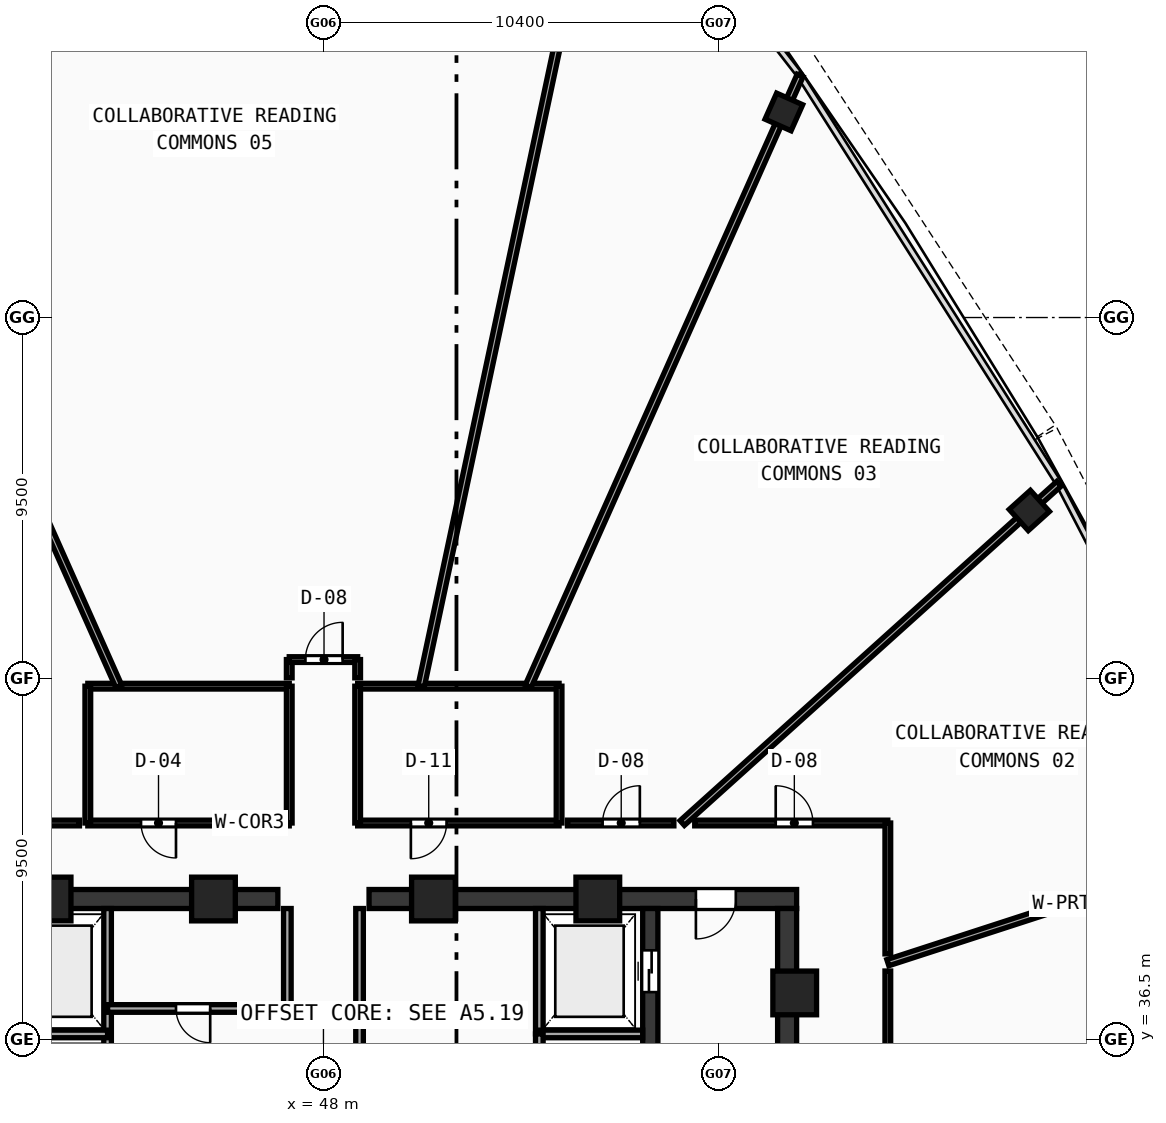
"""IFC4 building model, lengths in metres.
Left out: names, types, materials, properties, quantities, classifications, styles, units other than length and angle.
Written with IfcOpenShell. Run it as: python <this file> out.ifc"""

import sys

from ifc_helpers import new_model, si_unit, direction, frame, frame_2d, origin, origin_with_axes, origin_2d, place, context, subcontext, project, spatial, rectangle, hollow_rectangle, extrude, source, transform, mapped, element, fill, save


model = new_model("IFC4")
c1 = context("Model", 3, precision=1e-05, world=origin(), true_north=direction((0.0, 1.0)))
c2 = subcontext(c1, "Body", "Model", "MODEL_VIEW")
j1 = project(units=[si_unit("LENGTHUNIT", "METRE"), si_unit("PLANEANGLEUNIT", "RADIAN")], contexts=[c1])
p1 = place(None, origin())
s1 = spatial("IfcSite", under=j1, at=p1, CompositionType="ELEMENT")
p2 = place(p1, origin())
s2 = spatial("IfcBuilding", under=s1, at=p2, CompositionType="ELEMENT")
p3 = place(p2, frame((0.0, 0.0, 311.13)))
s3 = spatial("IfcBuildingStorey", under=s2, at=p3, CompositionType="ELEMENT", Elevation=311.13)
p4 = place(p3, frame((35.55, 40.2, 0.0), z_axis=(0.0, 0.0, 1.0), x_axis=(1.0, 0.0, 0.0)))
e1 = element("IfcWall", 1, at=p4, inside=s3, PredefinedType="SHEAR", context=c2, shape_type="SweptSolid", body=[
    extrude(rectangle(XDim=11.25, YDim=0.5, at=frame_2d((5.625, 0.0))), origin(), (0.0, 0.0, 1.0), 3.47),
])
p5 = place(p4, frame((1.6, 0.0, 0.0)))
e2 = element("IfcOpeningElement", 2, at=p5, cuts=e1, PredefinedType="OPENING", context=c2, shape_type="SweptSolid", body=[
    extrude(rectangle(XDim=1.05, YDim=2.1, at=frame_2d((0.525, 1.05))), frame((0.0, 0.26, 0.0), z_axis=(0.0, -1.0, 0.0), x_axis=(1.0, 0.0, 0.0)), (0.0, 0.0, 1.0), 0.52),
])
p6 = place(p3, frame((49.2, 40.2, 0.0), z_axis=(0.0, 0.0, 1.0), x_axis=(1.0, 0.0, 0.0)))
e3 = element("IfcWall", 3, at=p6, inside=s3, PredefinedType="SHEAR", context=c2, shape_type="SweptSolid", body=[
    extrude(rectangle(XDim=11.25, YDim=0.5, at=frame_2d((5.625, 0.0))), origin(), (0.0, 0.0, 1.0), 3.47),
])
p7 = place(p6, frame((8.6, 0.0, 0.0)))
e4 = element("IfcOpeningElement", 4, at=p7, cuts=e3, PredefinedType="OPENING", context=c2, shape_type="SweptSolid", body=[
    extrude(rectangle(XDim=1.05, YDim=2.1, at=frame_2d((0.525, 1.05))), frame((0.0, 0.26, 0.0), z_axis=(0.0, -1.0, 0.0), x_axis=(1.0, 0.0, 0.0)), (0.0, 0.0, 1.0), 0.52),
])
p8 = place(p3, frame((60.2, 27.75, 0.0), z_axis=(0.0, 0.0, 1.0), x_axis=(0.0, 1.0, 0.0)))
e5 = element("IfcWall", 5, at=p8, inside=s3, PredefinedType="SHEAR", context=c2, shape_type="SweptSolid", body=[
    extrude(rectangle(XDim=12.2, YDim=0.5, at=frame_2d((6.1, 0.0))), origin(), (0.0, 0.0, 1.0), 3.47),
])
p9 = place(p3, frame((56.6, 27.75, 0.0), z_axis=(0.0, 0.0, 1.0), x_axis=(0.0, 1.0, 0.0)))
e6 = element("IfcWall", 6, at=p9, inside=s3, PredefinedType="SHEAR", context=c2, shape_type="SweptSolid", body=[
    extrude(rectangle(XDim=12.2, YDim=0.4, at=frame_2d((6.1, 0.0))), origin(), (0.0, 0.0, 1.0), 3.47),
])
p10 = place(p9, frame((10.0, 0.0, 0.0)))
e7 = element("IfcOpeningElement", 7, at=p10, cuts=e6, PredefinedType="OPENING", context=c2, shape_type="SweptSolid", body=[
    extrude(rectangle(XDim=1.1, YDim=2.1, at=frame_2d((0.55, 1.05))), frame((0.0, 0.21, 0.0), z_axis=(0.0, -1.0, 0.0), x_axis=(1.0, 0.0, 0.0)), (0.0, 0.0, 1.0), 0.42),
])
m1 = source(origin(), c2, "Body", "SweptSolid", [
    extrude(hollow_rectangle(XDim=1.15, YDim=1.15, WallThickness=0.048, at=origin_2d()), origin(), (0.0, 0.0, 1.0), 3.73),
])
for number, where, z_axis, x_axis in (
    (8, (60.4, 37.729, -0.26), (0.0, 0.0, 1.0), (1.0, 0.0, 0.0)),
    (9, (55.219, 40.2, -0.26), (0.0, 0.0, 1.0), (1.0, 0.0, 0.0)),
    (10, (50.894, 40.2, -0.26), (0.0, 0.0, 1.0), (1.0, 0.0, 0.0)),
    (11, (45.106, 40.2, -0.26), (0.0, 0.0, 1.0), (1.0, 0.0, 0.0)),
    (12, (40.781, 40.2, -0.26), (0.0, 0.0, 1.0), (1.0, 0.0, 0.0)),
):
    element("IfcColumn", number, at=place(p3, frame(where, z_axis=z_axis, x_axis=x_axis)), inside=s3, PredefinedType="COLUMN", context=c2, shape_type="MappedRepresentation", body=[
        mapped(m1, transform((0.0, 0.0, 0.0), scale=1.0)),
    ])
m2 = source(origin(), c2, "Body", "SweptSolid", [
    extrude(hollow_rectangle(XDim=0.75, YDim=0.75, WallThickness=0.028, at=origin_2d()), origin(), (0.0, 0.0, 1.0), 3.73),
])
for number, where, z_axis, x_axis in (
    (13, (66.573, 50.424, -0.26), (0.0, 0.0, 1.0), (-0.669, 0.743, 0.0)),
    (14, (60.114, 60.909, -0.26), (0.0, 0.0, 1.0), (-0.914, 0.407, 0.0)),
):
    element("IfcColumn", number, at=place(p3, frame(where, z_axis=z_axis, x_axis=x_axis)), inside=s3, PredefinedType="COLUMN", context=c2, shape_type="MappedRepresentation", body=[
        mapped(m2, transform((0.0, 0.0, 0.0), scale=1.0)),
    ])
p11 = place(p3, frame((42.32, 33.5, 0.0), z_axis=(0.0, 0.0, 1.0), x_axis=(0.0, 1.0, 0.0)))
e15 = element("IfcWall", 15, at=p11, inside=s3, PredefinedType="SOLIDWALL", context=c2, shape_type="SweptSolid", body=[
    extrude(rectangle(XDim=6.45, YDim=0.2, at=frame_2d((3.225, 0.0))), origin(), (0.0, 0.0, 1.0), 3.47),
])
p12 = place(p11, frame((1.0, 0.0, 0.0)))
e16 = element("IfcOpeningElement", 16, at=p12, cuts=e15, PredefinedType="OPENING", context=c2, shape_type="SweptSolid", body=[
    extrude(rectangle(XDim=1.05, YDim=2.1, at=frame_2d((0.525, 1.05))), frame((0.0, 0.11, 0.0), z_axis=(0.0, -1.0, 0.0), x_axis=(1.0, 0.0, 0.0)), (0.0, 0.0, 1.0), 0.22),
])
p13 = place(p3, frame((39.6, 36.65, 0.0), z_axis=(0.0, 0.0, 1.0), x_axis=(1.0, 0.0, 0.0)))
e17 = element("IfcWall", 17, at=p13, inside=s3, PredefinedType="SOLIDWALL", context=c2, shape_type="SweptSolid", body=[
    extrude(rectangle(XDim=2.72, YDim=0.2, at=frame_2d((1.36, 0.0))), origin(), (0.0, 0.0, 1.0), 3.47),
])
p14 = place(p3, frame((53.68, 36.65, 0.0), z_axis=(0.0, 0.0, 1.0), x_axis=(0.0, 1.0, 0.0)))
e18 = element("IfcWall", 18, at=p14, inside=s3, PredefinedType="SOLIDWALL", context=c2, shape_type="SweptSolid", body=[
    extrude(rectangle(XDim=3.3, YDim=0.2, at=frame_2d((1.65, 0.0))), origin(), (0.0, 0.0, 1.0), 3.47),
])
p15 = place(p3, frame((53.68, 36.65, 0.0), z_axis=(0.0, 0.0, 1.0), x_axis=(1.0, 0.0, 0.0)))
e19 = element("IfcWall", 19, at=p15, inside=s3, PredefinedType="SOLIDWALL", context=c2, shape_type="SweptSolid", body=[
    extrude(rectangle(XDim=2.72, YDim=0.2, at=frame_2d((1.36, 0.0))), origin(), (0.0, 0.0, 1.0), 3.47),
])
p16 = place(p3, frame((42.32, 37.32, 0.0), z_axis=(0.0, 0.0, 1.0), x_axis=(1.0, 0.0, 0.0)))
e20 = element("IfcWall", 20, at=p16, inside=s3, PredefinedType="SOLIDWALL", context=c2, shape_type="SweptSolid", body=[
    extrude(rectangle(XDim=4.73, YDim=0.2, at=frame_2d((2.365, 0.0))), origin(), (0.0, 0.0, 1.0), 3.47),
])
p17 = place(p16, frame((1.8, 0.0, 0.0)))
e21 = element("IfcOpeningElement", 21, at=p17, cuts=e20, PredefinedType="OPENING", context=c2, shape_type="SweptSolid", body=[
    extrude(rectangle(XDim=0.9, YDim=2.1, at=frame_2d((0.45, 1.05))), frame((0.0, 0.11, 0.0), z_axis=(0.0, -1.0, 0.0), x_axis=(1.0, 0.0, 0.0)), (0.0, 0.0, 1.0), 0.22),
])
p18 = place(p3, frame((47.05, 37.32, 0.0), z_axis=(0.0, 0.0, 1.0), x_axis=(0.0, 1.0, 0.0)))
e22 = element("IfcWall", 22, at=p18, inside=s3, PredefinedType="SOLIDWALL", context=c2, shape_type="SweptSolid", body=[
    extrude(rectangle(XDim=2.63, YDim=0.2, at=frame_2d((1.315, 0.0))), origin(), (0.0, 0.0, 1.0), 3.47),
])
p19 = place(p3, frame((48.95, 35.85, 0.0), z_axis=(0.0, 0.0, 1.0), x_axis=(0.0, 1.0, 0.0)))
e23 = element("IfcWall", 23, at=p19, inside=s3, PredefinedType="SOLIDWALL", context=c2, shape_type="SweptSolid", body=[
    extrude(rectangle(XDim=4.1, YDim=0.2, at=frame_2d((2.05, 0.0))), origin(), (0.0, 0.0, 1.0), 3.47),
])
p20 = place(p3, frame((53.68, 27.6, 0.0), z_axis=(0.0, 0.0, 1.0), x_axis=(0.0, 1.0, 0.0)))
e24 = element("IfcWall", 24, at=p20, inside=s3, PredefinedType="SOLIDWALL", context=c2, shape_type="SweptSolid", body=[
    extrude(rectangle(XDim=9.05, YDim=0.2, at=frame_2d((4.525, 0.0))), origin(), (0.0, 0.0, 1.0), 3.47),
])
p21 = place(p20, frame((6.9, 0.0, 0.0)))
e25 = element("IfcOpeningElement", 25, at=p21, cuts=e24, PredefinedType="OPENING", context=c2, shape_type="SweptSolid", body=[
    extrude(rectangle(XDim=1.05, YDim=2.1, at=frame_2d((0.525, 1.05))), frame((0.0, 0.11, 0.0), z_axis=(0.0, -1.0, 0.0), x_axis=(1.0, 0.0, 0.0)), (0.0, 0.0, 1.0), 0.22),
])
p22 = place(p3, frame((41.8, 42.2, 0.0), z_axis=(0.0, 0.0, 1.0), x_axis=(1.0, 0.0, 0.0)))
e26 = element("IfcWall", 26, at=p22, inside=s3, PredefinedType="PARTITIONING", context=c2, shape_type="SweptSolid", body=[
    extrude(rectangle(XDim=5.3, YDim=0.15, at=frame_2d((2.65, 0.0))), origin(), (0.0, 0.0, 1.0), 2.87),
])
p23 = place(p22, frame((1.4, 0.0, 0.0)))
e27 = element("IfcOpeningElement", 27, at=p23, cuts=e26, PredefinedType="OPENING", context=c2, shape_type="SweptSolid", body=[
    extrude(rectangle(XDim=0.92, YDim=2.1, at=frame_2d((0.46, 1.05))), frame((0.0, 0.085, 0.0), z_axis=(0.0, -1.0, 0.0), x_axis=(1.0, 0.0, 0.0)), (0.0, 0.0, 1.0), 0.17),
])
p24 = place(p3, frame((41.8, 45.8, 0.0), z_axis=(0.0, 0.0, 1.0), x_axis=(1.0, 0.0, 0.0)))
e28 = element("IfcWall", 28, at=p24, inside=s3, PredefinedType="PARTITIONING", context=c2, shape_type="SweptSolid", body=[
    extrude(rectangle(XDim=5.3, YDim=0.15, at=frame_2d((2.65, 0.0))), origin(), (0.0, 0.0, 1.0), 2.87),
])
for number, where, z_axis, x_axis in (
    (29, (41.8, 42.2, 0.0), (0.0, 0.0, 1.0), (0.0, 1.0, 0.0)),
    (30, (47.1, 42.2, 0.0), (0.0, 0.0, 1.0), (0.0, 1.0, 0.0)),
):
    element("IfcWall", number, at=place(p3, frame(where, z_axis=z_axis, x_axis=x_axis)), inside=s3, PredefinedType="PARTITIONING", context=c2, shape_type="SweptSolid", body=[
        extrude(rectangle(XDim=3.6, YDim=0.15, at=frame_2d((1.8, 0.0))), origin(), (0.0, 0.0, 1.0), 3.47),
    ])
p25 = place(p3, frame((48.9, 42.2, 0.0), z_axis=(0.0, 0.0, 1.0), x_axis=(1.0, 0.0, 0.0)))
e31 = element("IfcWall", 31, at=p25, inside=s3, PredefinedType="PARTITIONING", context=c2, shape_type="SweptSolid", body=[
    extrude(rectangle(XDim=5.3, YDim=0.15, at=frame_2d((2.65, 0.0))), origin(), (0.0, 0.0, 1.0), 2.87),
])
p26 = place(p25, frame((1.4, 0.0, 0.0)))
e32 = element("IfcOpeningElement", 32, at=p26, cuts=e31, PredefinedType="OPENING", context=c2, shape_type="SweptSolid", body=[
    extrude(rectangle(XDim=0.94, YDim=2.1, at=frame_2d((0.47, 1.05))), frame((0.0, 0.085, 0.0), z_axis=(0.0, -1.0, 0.0), x_axis=(1.0, 0.0, 0.0)), (0.0, 0.0, 1.0), 0.17),
])
p27 = place(p3, frame((48.9, 45.8, 0.0), z_axis=(0.0, 0.0, 1.0), x_axis=(1.0, 0.0, 0.0)))
e33 = element("IfcWall", 33, at=p27, inside=s3, PredefinedType="PARTITIONING", context=c2, shape_type="SweptSolid", body=[
    extrude(rectangle(XDim=5.3, YDim=0.15, at=frame_2d((2.65, 0.0))), origin(), (0.0, 0.0, 1.0), 2.87),
])
for number, where, z_axis, x_axis in (
    (34, (48.9, 42.2, 0.0), (0.0, 0.0, 1.0), (0.0, 1.0, 0.0)),
    (35, (54.2, 42.2, 0.0), (0.0, 0.0, 1.0), (0.0, 1.0, 0.0)),
):
    element("IfcWall", number, at=place(p3, frame(where, z_axis=z_axis, x_axis=x_axis)), inside=s3, PredefinedType="PARTITIONING", context=c2, shape_type="SweptSolid", body=[
        extrude(rectangle(XDim=3.6, YDim=0.15, at=frame_2d((1.8, 0.0))), origin(), (0.0, 0.0, 1.0), 3.47),
    ])
p28 = place(p3, frame((62.85, 38.525, 0.0), z_axis=(0.0, 0.0, 1.0), x_axis=(0.951056273407, 0.309017741906, 0.0)))
e36 = element("IfcWall", 36, at=p28, inside=s3, PredefinedType="PARTITIONING", context=c2, shape_type="SweptSolid", body=[
    extrude(rectangle(XDim=9.937, YDim=0.17, at=frame_2d((4.969, 0.0))), origin(), (0.0, 0.0, 1.0), 2.87),
])
p29 = place(p3, frame((57.44, 42.2, 0.0), z_axis=(0.0, 0.0, 1.0), x_axis=(0.743143971996, 0.669131554245, 0.0)))
e37 = element("IfcWall", 37, at=p29, inside=s3, PredefinedType="PARTITIONING", context=c2, shape_type="SweptSolid", body=[
    extrude(rectangle(XDim=13.34, YDim=0.17, at=frame_2d((6.67, 0.0))), origin(), (0.0, 0.0, 1.0), 2.87),
])
p30 = place(p3, frame((53.387, 45.8, 0.0), z_axis=(0.0, 0.0, 1.0), x_axis=(0.406746244391, 0.913541182801, 0.0)))
e38 = element("IfcWall", 38, at=p30, inside=s3, PredefinedType="PARTITIONING", context=c2, shape_type="SweptSolid", body=[
    extrude(rectangle(XDim=17.589, YDim=0.17, at=frame_2d((8.794, 0.0))), origin(), (0.0, 0.0, 1.0), 2.87),
])
p31 = place(p3, frame((50.572, 45.8, 0.0), z_axis=(0.0, 0.0, 1.0), x_axis=(0.207911865665, 0.978147563569, 0.0)))
e39 = element("IfcWall", 39, at=p31, inside=s3, PredefinedType="PARTITIONING", context=c2, shape_type="SweptSolid", body=[
    extrude(rectangle(XDim=23.201, YDim=0.17, at=frame_2d((11.601, 0.0))), origin(), (0.0, 0.0, 1.0), 2.87),
])
p32 = place(p3, frame((42.613, 45.8, 0.0), z_axis=(0.0, 0.0, 1.0), x_axis=(-0.406746244391, 0.913541182801, 0.0)))
e40 = element("IfcWall", 40, at=p32, inside=s3, PredefinedType="PARTITIONING", context=c2, shape_type="SweptSolid", body=[
    extrude(rectangle(XDim=17.589, YDim=0.17, at=frame_2d((8.794, 0.0))), origin(), (0.0, 0.0, 1.0), 2.87),
])
p33 = place(p3, frame((33.15, 42.2, 0.0), z_axis=(0.0, 0.0, 1.0), x_axis=(1.0, 0.0, 0.0)))
e41 = element("IfcWall", 41, at=p33, inside=s3, PredefinedType="PARTITIONING", context=c2, shape_type="SweptSolid", body=[
    extrude(rectangle(XDim=8.43, YDim=0.15, at=frame_2d((4.215, 0.0))), origin(), (0.0, 0.0, 1.0), 2.87),
])
p34 = place(p33, frame((3.62, 0.0, 0.0)))
e42 = element("IfcOpeningElement", 42, at=p34, cuts=e41, PredefinedType="OPENING", context=c2, shape_type="SweptSolid", body=[
    extrude(rectangle(XDim=0.98, YDim=2.12, at=frame_2d((0.49, 1.06))), frame((0.0, 0.085, 0.0), z_axis=(0.0, -1.0, 0.0), x_axis=(1.0, 0.0, 0.0)), (0.0, 0.0, 1.0), 0.17),
])
p35 = place(p3, frame((47.1, 46.02, 0.0), z_axis=(0.0, 0.0, 1.0), x_axis=(0.0, 1.0, 0.0)))
e43 = element("IfcWall", 43, at=p35, inside=s3, PredefinedType="PARTITIONING", context=c2, shape_type="SweptSolid", body=[
    extrude(rectangle(XDim=0.48, YDim=0.15, at=frame_2d((0.24, 0.0))), origin(), (0.0, 0.0, 1.0), 3.47),
])
p36 = place(p3, frame((47.1, 46.5, 0.0), z_axis=(0.0, 0.0, 1.0), x_axis=(1.0, 0.0, 0.0)))
e44 = element("IfcWall", 44, at=p36, inside=s3, PredefinedType="PARTITIONING", context=c2, shape_type="SweptSolid", body=[
    extrude(rectangle(XDim=1.8, YDim=0.15, at=frame_2d((0.9, 0.0))), origin(), (0.0, 0.0, 1.0), 3.47),
])
p37 = place(p36, frame((0.425, 0.0, 0.0)))
e45 = element("IfcOpeningElement", 45, at=p37, cuts=e44, PredefinedType="OPENING", context=c2, shape_type="SweptSolid", body=[
    extrude(rectangle(XDim=0.98, YDim=2.12, at=frame_2d((0.49, 1.06))), frame((0.0, 0.085, 0.0), z_axis=(0.0, -1.0, 0.0), x_axis=(1.0, 0.0, 0.0)), (0.0, 0.0, 1.0), 0.17),
])
p38 = place(p3, frame((48.9, 46.5, 0.0), z_axis=(0.0, 0.0, 1.0), x_axis=(0.0, -1.0, 0.0)))
e46 = element("IfcWall", 46, at=p38, inside=s3, PredefinedType="PARTITIONING", context=c2, shape_type="SweptSolid", body=[
    extrude(rectangle(XDim=0.48, YDim=0.15, at=frame_2d((0.24, 0.0))), origin(), (0.0, 0.0, 1.0), 3.47),
])
p39 = place(p3, frame((54.42, 42.2, 0.0), z_axis=(0.0, 0.0, 1.0), x_axis=(1.0, 0.0, 0.0)))
e47 = element("IfcWall", 47, at=p39, inside=s3, PredefinedType="PARTITIONING", context=c2, shape_type="SweptSolid", body=[
    extrude(rectangle(XDim=2.801, YDim=0.15, at=frame_2d((1.4, 0.0))), origin(), (0.0, 0.0, 1.0), 2.87),
])
p40 = place(p39, frame((0.925, 0.0, 0.0)))
e48 = element("IfcOpeningElement", 48, at=p40, cuts=e47, PredefinedType="OPENING", context=c2, shape_type="SweptSolid", body=[
    extrude(rectangle(XDim=0.98, YDim=2.12, at=frame_2d((0.49, 1.06))), frame((0.0, 0.085, 0.0), z_axis=(0.0, -1.0, 0.0), x_axis=(1.0, 0.0, 0.0)), (0.0, 0.0, 1.0), 0.17),
])
p41 = place(p3, frame((57.769, 42.2, 0.0), z_axis=(0.0, 0.0, 1.0), x_axis=(1.0, 0.0, 0.0)))
e49 = element("IfcWall", 49, at=p41, inside=s3, PredefinedType="PARTITIONING", context=c2, shape_type="SweptSolid", body=[
    extrude(rectangle(XDim=5.081, YDim=0.15, at=frame_2d((2.541, 0.0))), origin(), (0.0, 0.0, 1.0), 3.12),
])
p42 = place(p41, frame((2.131, 0.0, 0.0)))
e50 = element("IfcOpeningElement", 50, at=p42, cuts=e49, PredefinedType="OPENING", context=c2, shape_type="SweptSolid", body=[
    extrude(rectangle(XDim=0.98, YDim=2.12, at=frame_2d((0.49, 1.06))), frame((0.0, 0.085, 0.0), z_axis=(0.0, -1.0, 0.0), x_axis=(1.0, 0.0, 0.0)), (0.0, 0.0, 1.0), 0.17),
])
p43 = place(p3, frame((62.85, 42.2, 0.0), z_axis=(0.0, 0.0, 1.0), x_axis=(0.0, -1.0, 0.0)))
e51 = element("IfcWall", 51, at=p43, inside=s3, PredefinedType="PARTITIONING", context=c2, shape_type="SweptSolid", body=[
    extrude(rectangle(XDim=3.444, YDim=0.15, at=frame_2d((1.722, 0.0))), origin(), (0.0, 0.0, 1.0), 3.12),
])
p44 = place(p3, frame((62.85, 38.305, 0.0), z_axis=(0.0, 0.0, 1.0), x_axis=(0.0, -1.0, 0.0)))
e52 = element("IfcWall", 52, at=p44, inside=s3, PredefinedType="PARTITIONING", context=c2, shape_type="SweptSolid", body=[
    extrude(rectangle(XDim=7.004, YDim=0.15, at=frame_2d((3.502, 0.0))), origin(), (0.0, 0.0, 1.0), 3.47),
])
p45 = place(p44, frame((3.027, 0.0, 0.0)))
e53 = element("IfcOpeningElement", 53, at=p45, cuts=e52, PredefinedType="OPENING", context=c2, shape_type="SweptSolid", body=[
    extrude(rectangle(XDim=0.98, YDim=2.12, at=frame_2d((0.49, 1.06))), frame((0.0, 0.085, 0.0), z_axis=(0.0, -1.0, 0.0), x_axis=(1.0, 0.0, 0.0)), (0.0, 0.0, 1.0), 0.17),
])
m3 = source(origin(), c2, "Body", "SweptSolid", [
    extrude(rectangle(XDim=1.05, YDim=2.1, at=frame_2d((0.525, 1.05))), frame((0.0, 0.025, 0.0), z_axis=(0.0, -1.0, 0.0), x_axis=(1.0, 0.0, 0.0)), (0.0, 0.0, 1.0), 0.05),
])
p46 = place(p7, frame((1.05, 0.0, 0.0), z_axis=(0.0, 0.0, 1.0), x_axis=(-1.0, 0.0, 0.0)))
e54 = element("IfcDoor", 54, at=p46, inside=s3, OperationType="SINGLE_SWING_RIGHT", PredefinedType="DOOR", context=c2, shape_type="MappedRepresentation", body=[
    mapped(m3, transform((0.0, 0.0, 0.0), scale=1.0)),
])
fill(e4, e54)
m4 = source(origin(), c2, "Body", "SweptSolid", [
    extrude(rectangle(XDim=1.1, YDim=2.1, at=frame_2d((0.55, 1.05))), frame((0.0, 0.025, 0.0), z_axis=(0.0, -1.0, 0.0), x_axis=(1.0, 0.0, 0.0)), (0.0, 0.0, 1.0), 0.05),
])
p47 = place(p10, origin_with_axes())
e55 = element("IfcDoor", 55, at=p47, inside=s3, OperationType="DOUBLE_DOOR_SLIDING", PredefinedType="DOOR", context=c2, shape_type="MappedRepresentation", body=[
    mapped(m4, transform((0.0, 0.0, 0.0), scale=1.0)),
])
fill(e7, e55)
m5 = source(origin(), c2, "Body", "SweptSolid", [
    extrude(rectangle(XDim=0.9, YDim=2.1, at=frame_2d((0.45, 1.05))), frame((0.0, 0.025, 0.0), z_axis=(0.0, -1.0, 0.0), x_axis=(1.0, 0.0, 0.0)), (0.0, 0.0, 1.0), 0.05),
])
p48 = place(p17, frame((0.9, 0.0, 0.0), z_axis=(0.0, 0.0, 1.0), x_axis=(-1.0, 0.0, 0.0)))
e56 = element("IfcDoor", 56, at=p48, inside=s3, OperationType="SINGLE_SWING_LEFT", PredefinedType="DOOR", context=c2, shape_type="MappedRepresentation", body=[
    mapped(m5, transform((0.0, 0.0, 0.0), scale=1.0)),
])
fill(e21, e56)
m6 = source(origin(), c2, "Body", "SweptSolid", [
    extrude(rectangle(XDim=0.92, YDim=2.1, at=frame_2d((0.46, 1.05))), frame((0.0, 0.025, 0.0), z_axis=(0.0, -1.0, 0.0), x_axis=(1.0, 0.0, 0.0)), (0.0, 0.0, 1.0), 0.05),
])
p49 = place(p23, frame((0.92, 0.0, 0.0), z_axis=(0.0, 0.0, 1.0), x_axis=(-1.0, 0.0, 0.0)))
e57 = element("IfcDoor", 57, at=p49, inside=s3, OperationType="SINGLE_SWING_LEFT", PredefinedType="DOOR", context=c2, shape_type="MappedRepresentation", body=[
    mapped(m6, transform((0.0, 0.0, 0.0), scale=1.0)),
])
fill(e27, e57)
m7 = source(origin(), c2, "Body", "SweptSolid", [
    extrude(rectangle(XDim=0.94, YDim=2.1, at=frame_2d((0.47, 1.05))), frame((0.0, 0.025, 0.0), z_axis=(0.0, -1.0, 0.0), x_axis=(1.0, 0.0, 0.0)), (0.0, 0.0, 1.0), 0.05),
])
p50 = place(p26, frame((0.94, 0.0, 0.0), z_axis=(0.0, 0.0, 1.0), x_axis=(-1.0, 0.0, 0.0)))
e58 = element("IfcDoor", 58, at=p50, inside=s3, OperationType="SINGLE_SWING_RIGHT", PredefinedType="DOOR", context=c2, shape_type="MappedRepresentation", body=[
    mapped(m7, transform((0.0, 0.0, 0.0), scale=1.0)),
])
fill(e32, e58)
m8 = source(origin(), c2, "Body", "SweptSolid", [
    extrude(rectangle(XDim=0.98, YDim=2.12, at=frame_2d((0.49, 1.06))), frame((0.0, 0.025, 0.0), z_axis=(0.0, -1.0, 0.0), x_axis=(1.0, 0.0, 0.0)), (0.0, 0.0, 1.0), 0.05),
])
p51 = place(p42, origin_with_axes())
e59 = element("IfcDoor", 59, at=p51, inside=s3, OperationType="SINGLE_SWING_LEFT", PredefinedType="DOOR", context=c2, shape_type="MappedRepresentation", body=[
    mapped(m8, transform((0.0, 0.0, 0.0), scale=1.0)),
])
fill(e50, e59)
p52 = place(p40, origin_with_axes())
e60 = element("IfcDoor", 60, at=p52, inside=s3, OperationType="SINGLE_SWING_RIGHT", PredefinedType="DOOR", context=c2, shape_type="MappedRepresentation", body=[
    mapped(m8, transform((0.0, 0.0, 0.0), scale=1.0)),
])
fill(e48, e60)
p53 = place(p37, origin_with_axes())
e61 = element("IfcDoor", 61, at=p53, inside=s3, OperationType="SINGLE_SWING_RIGHT", PredefinedType="DOOR", context=c2, shape_type="MappedRepresentation", body=[
    mapped(m8, transform((0.0, 0.0, 0.0), scale=1.0)),
])
fill(e45, e61)
save(model, sys.argv[1])
